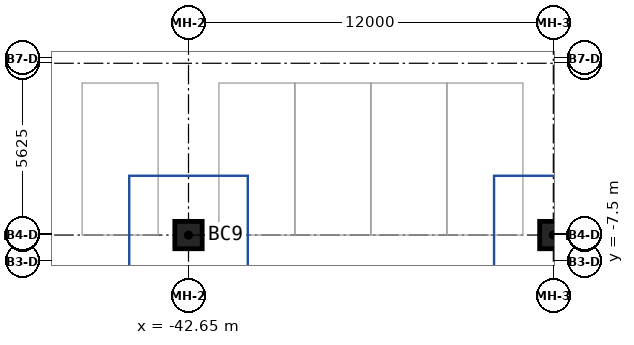
"""IFC4 building model, lengths in metres.
Left out: names, types, materials, properties, quantities, classifications, styles, units other than length and angle.
Written with IfcOpenShell. Run it as: python <this file> out.ifc"""

import sys

from ifc_helpers import new_model, si_unit, direction, frame, origin, origin_2d, place, context, subcontext, project, spatial, rectangle, extrude, source, transform, mapped, element, save


model = new_model("IFC4")
c1 = context("Model", 3, precision=1e-05, world=origin(), true_north=direction((0.0, 1.0)))
c2 = subcontext(c1, "Body", "Model", "MODEL_VIEW")
j1 = project(units=[si_unit("LENGTHUNIT", "METRE"), si_unit("PLANEANGLEUNIT", "RADIAN")], contexts=[c1])
p1 = place(None, origin())
s1 = spatial("IfcSite", under=j1, at=p1, CompositionType="ELEMENT")
p2 = place(p1, origin())
s2 = spatial("IfcBuilding", under=s1, at=p2, CompositionType="ELEMENT")
p3 = place(p2, frame((0.0, 0.0, -9.0)))
s3 = spatial("IfcBuildingStorey", under=s2, at=p3, CompositionType="ELEMENT", Elevation=-9.0)
m1 = source(origin(), c2, "Body", "SweptSolid", [
    extrude(rectangle(XDim=0.9, YDim=0.9, at=origin_2d()), origin(), (0.0, 0.0, 1.0), 4.5),
])
for number, where, z_axis, x_axis in (
    (1, (-42.65, -6.65, 0.0), (0.0, 0.0, 1.0), (1.0, 0.0, 0.0)),
    (2, (-30.65, -6.65, 0.0), (0.0, 0.0, 1.0), (1.0, 0.0, 0.0)),
):
    element("IfcColumn", number, at=place(p3, frame(where, z_axis=z_axis, x_axis=x_axis)), inside=s3, PredefinedType="COLUMN", context=c2, shape_type="MappedRepresentation", body=[
        mapped(m1, transform((0.0, 0.0, 0.0))),
    ])
save(model, sys.argv[1])
